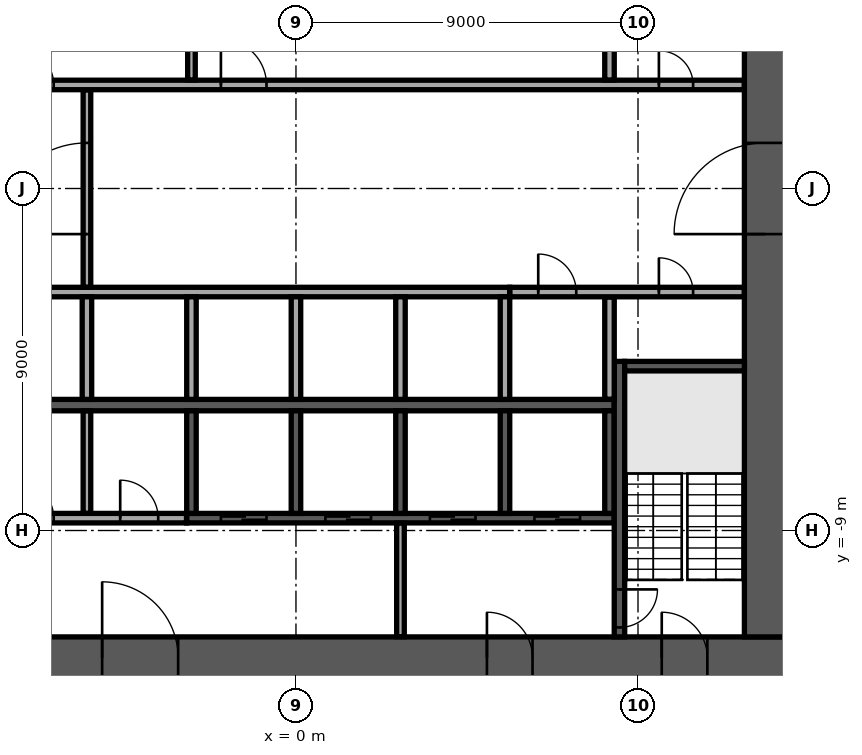
"""IFC4 building model, lengths in metres.
Left out: names, types, materials, properties, quantities, classifications, styles, units other than length and angle.
Written with IfcOpenShell. Run it as: python <this file> out.ifc"""

import sys

from ifc_helpers import new_model, si_unit, direction, frame, frame_2d, origin, place, context, subcontext, project, spatial, rectangle, extrude, element, fill, save


model = new_model("IFC4")
c1 = context("Model", 3, precision=1e-05, world=origin(), true_north=direction((0.0, 1.0)))
c2 = subcontext(c1, "Body", "Model", "MODEL_VIEW")
j1 = project(units=[si_unit("LENGTHUNIT", "METRE"), si_unit("PLANEANGLEUNIT", "RADIAN")], contexts=[c1])
p1 = place(None, origin())
s1 = spatial("IfcSite", under=j1, at=p1, CompositionType="ELEMENT")
p2 = place(p1, origin())
s2 = spatial("IfcBuilding", under=s1, at=p2, CompositionType="ELEMENT")
p3 = place(p2, frame((0.0, 0.0, 122.1)))
s3 = spatial("IfcBuildingStorey", under=s2, at=p3, CompositionType="ELEMENT", Elevation=122.1)
p4 = place(p3, frame((-12.9, -12.35, 0.0), z_axis=(0.0, 0.0, 1.0), x_axis=(1.0, 0.0, 0.0)))
e1 = element("IfcWall", 1, at=p4, inside=s3, PredefinedType="SHEAR", context=c2, shape_type="SweptSolid", body=[
    extrude(rectangle(XDim=25.8, YDim=1.1, at=frame_2d((12.9, 0.0))), origin(), (0.0, 0.0, 1.0), 3.58),
])
p5 = place(p4, frame((7.8, 0.0, 0.0)))
e2 = element("IfcOpeningElement", 2, at=p5, cuts=e1, PredefinedType="OPENING", context=c2, shape_type="SweptSolid", body=[
    extrude(rectangle(XDim=2.0, YDim=2.1, at=frame_2d((1.0, 1.05))), frame((0.0, 0.56, 0.0), z_axis=(0.0, -1.0, 0.0), x_axis=(1.0, 0.0, 0.0)), (0.0, 0.0, 1.0), 1.12),
])
p6 = place(p4, frame((17.925, 0.0, 0.0)))
e3 = element("IfcOpeningElement", 3, at=p6, cuts=e1, PredefinedType="OPENING", context=c2, shape_type="SweptSolid", body=[
    extrude(rectangle(XDim=1.2, YDim=2.1, at=frame_2d((0.6, 1.05))), frame((0.0, 0.56, 0.0), z_axis=(0.0, -1.0, 0.0), x_axis=(1.0, 0.0, 0.0)), (0.0, 0.0, 1.0), 1.12),
])
p7 = place(p4, frame((2.075, 0.0, 0.0)))
e4 = element("IfcOpeningElement", 4, at=p7, cuts=e1, PredefinedType="OPENING", context=c2, shape_type="SweptSolid", body=[
    extrude(rectangle(XDim=1.2, YDim=2.1, at=frame_2d((0.6, 1.05))), frame((0.0, 0.56, 0.0), z_axis=(0.0, -1.0, 0.0), x_axis=(1.0, 0.0, 0.0)), (0.0, 0.0, 1.0), 1.12),
])
p8 = place(p4, frame((22.525, 0.0, 0.0)))
e5 = element("IfcOpeningElement", 5, at=p8, cuts=e1, PredefinedType="OPENING", context=c2, shape_type="SweptSolid", body=[
    extrude(rectangle(XDim=1.2, YDim=2.1, at=frame_2d((0.6, 1.05))), frame((0.0, 0.56, 0.0), z_axis=(0.0, -1.0, 0.0), x_axis=(1.0, 0.0, 0.0)), (0.0, 0.0, 1.0), 1.12),
])
p9 = place(p3, frame((12.35, -11.8, 0.0), z_axis=(0.0, 0.0, 1.0), x_axis=(0.0, 1.0, 0.0)))
e6 = element("IfcWall", 6, at=p9, inside=s3, PredefinedType="SHEAR", context=c2, shape_type="SweptSolid", body=[
    extrude(rectangle(XDim=23.6, YDim=1.1, at=frame_2d((11.8, 0.0))), origin(), (0.0, 0.0, 1.0), 3.58),
])
p10 = place(p9, frame((10.6, 0.0, 0.0)))
e7 = element("IfcOpeningElement", 7, at=p10, cuts=e6, PredefinedType="OPENING", context=c2, shape_type="SweptSolid", body=[
    extrude(rectangle(XDim=2.4, YDim=2.4, at=frame_2d((1.2, 1.2))), frame((0.0, 0.56, 0.0), z_axis=(0.0, -1.0, 0.0), x_axis=(1.0, 0.0, 0.0)), (0.0, 0.0, 1.0), 1.12),
])
p11 = place(p3, frame((-8.375, -5.7, 0.0), z_axis=(0.0, 0.0, 1.0), x_axis=(1.0, 0.0, 0.0)))
e8 = element("IfcWall", 8, at=p11, inside=s3, PredefinedType="SOLIDWALL", context=c2, shape_type="SweptSolid", body=[
    extrude(rectangle(XDim=16.75, YDim=0.3, at=frame_2d((8.375, 0.0))), origin(), (0.0, 0.0, 1.0), 3.58),
])
p12 = place(p3, frame((-8.375, -2.725, 0.0), z_axis=(0.0, 0.0, 1.0), x_axis=(1.0, 0.0, 0.0)))
e9 = element("IfcWall", 9, at=p12, inside=s3, PredefinedType="SOLIDWALL", context=c2, shape_type="SweptSolid", body=[
    extrude(rectangle(XDim=14.0, YDim=0.25, at=frame_2d((7.0, 0.0))), origin(), (0.0, 0.0, 1.0), 3.58),
])
for number, where, z_axis, x_axis in (
    (10, (-5.5, -5.55, 0.0), (0.0, 0.0, 1.0), (0.0, 1.0, 0.0)),
    (11, (-2.75, -5.55, 0.0), (0.0, 0.0, 1.0), (0.0, 1.0, 0.0)),
    (12, (0.0, -5.55, 0.0), (0.0, 0.0, 1.0), (0.0, 1.0, 0.0)),
    (13, (2.75, -5.55, 0.0), (0.0, 0.0, 1.0), (0.0, 1.0, 0.0)),
    (14, (5.5, -5.55, 0.0), (0.0, 0.0, 1.0), (0.0, 1.0, 0.0)),
):
    element("IfcWall", number, at=place(p3, frame(where, z_axis=z_axis, x_axis=x_axis)), inside=s3, PredefinedType="SOLIDWALL", context=c2, shape_type="SweptSolid", body=[
        extrude(rectangle(XDim=2.7, YDim=0.25, at=frame_2d((1.35, 0.0))), origin(), (0.0, 0.0, 1.0), 3.58),
    ])
p13 = place(p3, frame((-2.875, -8.675, 0.0), z_axis=(0.0, 0.0, 1.0), x_axis=(1.0, 0.0, 0.0)))
e15 = element("IfcWall", 15, at=p13, inside=s3, PredefinedType="SOLIDWALL", context=c2, shape_type="SweptSolid", body=[
    extrude(rectangle(XDim=11.25, YDim=0.25, at=frame_2d((5.625, 0.0))), origin(), (0.0, 0.0, 1.0), 3.58),
])
p14 = place(p13, frame((0.9, 0.0, 0.0)))
e16 = element("IfcOpeningElement", 16, at=p14, cuts=e15, PredefinedType="OPENING", context=c2, shape_type="SweptSolid", body=[
    extrude(rectangle(XDim=1.2, YDim=2.1, at=frame_2d((0.6, 1.05))), frame((0.0, 0.135, 0.0), z_axis=(0.0, -1.0, 0.0), x_axis=(1.0, 0.0, 0.0)), (0.0, 0.0, 1.0), 0.27),
])
p15 = place(p13, frame((3.65, 0.0, 0.0)))
e17 = element("IfcOpeningElement", 17, at=p15, cuts=e15, PredefinedType="OPENING", context=c2, shape_type="SweptSolid", body=[
    extrude(rectangle(XDim=1.2, YDim=2.1, at=frame_2d((0.6, 1.05))), frame((0.0, 0.135, 0.0), z_axis=(0.0, -1.0, 0.0), x_axis=(1.0, 0.0, 0.0)), (0.0, 0.0, 1.0), 0.27),
])
p16 = place(p13, frame((6.4, 0.0, 0.0)))
e18 = element("IfcOpeningElement", 18, at=p16, cuts=e15, PredefinedType="OPENING", context=c2, shape_type="SweptSolid", body=[
    extrude(rectangle(XDim=1.2, YDim=2.1, at=frame_2d((0.6, 1.05))), frame((0.0, 0.135, 0.0), z_axis=(0.0, -1.0, 0.0), x_axis=(1.0, 0.0, 0.0)), (0.0, 0.0, 1.0), 0.27),
])
p17 = place(p13, frame((9.15, 0.0, 0.0)))
e19 = element("IfcOpeningElement", 19, at=p17, cuts=e15, PredefinedType="OPENING", context=c2, shape_type="SweptSolid", body=[
    extrude(rectangle(XDim=1.2, YDim=2.1, at=frame_2d((0.6, 1.05))), frame((0.0, 0.135, 0.0), z_axis=(0.0, -1.0, 0.0), x_axis=(1.0, 0.0, 0.0)), (0.0, 0.0, 1.0), 0.27),
])
for number, where, z_axis, x_axis in (
    (20, (-2.75, -8.55, 0.0), (0.0, 0.0, 1.0), (0.0, 1.0, 0.0)),
    (21, (0.0, -8.55, 0.0), (0.0, 0.0, 1.0), (0.0, 1.0, 0.0)),
    (22, (2.75, -8.55, 0.0), (0.0, 0.0, 1.0), (0.0, 1.0, 0.0)),
    (23, (5.5, -8.55, 0.0), (0.0, 0.0, 1.0), (0.0, 1.0, 0.0)),
    (24, (8.25, -8.55, 0.0), (0.0, 0.0, 1.0), (0.0, 1.0, 0.0)),
):
    element("IfcWall", number, at=place(p3, frame(where, z_axis=z_axis, x_axis=x_axis)), inside=s3, PredefinedType="SOLIDWALL", context=c2, shape_type="SweptSolid", body=[
        extrude(rectangle(XDim=2.7, YDim=0.25, at=frame_2d((1.35, 0.0))), origin(), (0.0, 0.0, 1.0), 3.58),
    ])
p18 = place(p3, frame((8.512, -4.55, 0.0), z_axis=(0.0, 0.0, 1.0), x_axis=(0.0, -1.0, 0.0)))
e25 = element("IfcWall", 25, at=p18, inside=s3, PredefinedType="SOLIDWALL", context=c2, shape_type="SweptSolid", body=[
    extrude(rectangle(XDim=7.25, YDim=0.275, at=frame_2d((3.625, 0.0))), origin(), (0.0, 0.0, 1.0), 3.58),
])
p19 = place(p18, frame((6.0, 0.0, 0.0)))
e26 = element("IfcOpeningElement", 26, at=p19, cuts=e25, PredefinedType="OPENING", context=c2, shape_type="SweptSolid", body=[
    extrude(rectangle(XDim=1.0, YDim=2.1, at=frame_2d((0.5, 1.05))), frame((0.0, 0.147, 0.0), z_axis=(0.0, -1.0, 0.0), x_axis=(1.0, 0.0, 0.0)), (0.0, 0.0, 1.0), 0.295),
])
p20 = place(p3, frame((8.65, -4.675, 0.0), z_axis=(0.0, 0.0, 1.0), x_axis=(1.0, 0.0, 0.0)))
e27 = element("IfcWall", 27, at=p20, inside=s3, PredefinedType="SOLIDWALL", context=c2, shape_type="SweptSolid", body=[
    extrude(rectangle(XDim=3.15, YDim=0.25, at=frame_2d((1.575, 0.0))), origin(), (0.0, 0.0, 1.0), 3.58),
])
p21 = place(p3, frame((2.75, -11.795, 0.0), z_axis=(0.0, 0.0, 1.0), x_axis=(0.0, 1.0, 0.0)))
e28 = element("IfcWall", 28, at=p21, inside=s3, PredefinedType="PARTITIONING", context=c2, shape_type="SweptSolid", body=[
    extrude(rectangle(XDim=2.99, YDim=0.2, at=frame_2d((1.495, 0.0))), origin(), (0.0, 0.0, 1.0), 3.58),
])
p22 = place(p3, frame((-8.37, -8.675, 0.0), z_axis=(0.0, 0.0, 1.0), x_axis=(1.0, 0.0, 0.0)))
e29 = element("IfcWall", 29, at=p22, inside=s3, PredefinedType="PARTITIONING", context=c2, shape_type="SweptSolid", body=[
    extrude(rectangle(XDim=5.49, YDim=0.25, at=frame_2d((2.745, 0.0))), origin(), (0.0, 0.0, 1.0), 3.58),
])
p23 = place(p22, frame((0.995, 0.0, 0.0)))
e30 = element("IfcOpeningElement", 30, at=p23, cuts=e29, PredefinedType="OPENING", context=c2, shape_type="SweptSolid", body=[
    extrude(rectangle(XDim=1.0, YDim=2.1, at=frame_2d((0.5, 1.05))), frame((0.0, 0.135, 0.0), z_axis=(0.0, -1.0, 0.0), x_axis=(1.0, 0.0, 0.0)), (0.0, 0.0, 1.0), 0.27),
])
p24 = place(p22, frame((3.745, 0.0, 0.0)))
e31 = element("IfcOpeningElement", 31, at=p24, cuts=e29, PredefinedType="OPENING", context=c2, shape_type="SweptSolid", body=[
    extrude(rectangle(XDim=1.0, YDim=2.1, at=frame_2d((0.5, 1.05))), frame((0.0, 0.135, 0.0), z_axis=(0.0, -1.0, 0.0), x_axis=(1.0, 0.0, 0.0)), (0.0, 0.0, 1.0), 0.27),
])
p25 = place(p3, frame((-5.5, -8.545, 0.0), z_axis=(0.0, 0.0, 1.0), x_axis=(0.0, 1.0, 0.0)))
e32 = element("IfcWall", 32, at=p25, inside=s3, PredefinedType="PARTITIONING", context=c2, shape_type="SweptSolid", body=[
    extrude(rectangle(XDim=2.69, YDim=0.2, at=frame_2d((1.345, 0.0))), origin(), (0.0, 0.0, 1.0), 3.58),
])
p26 = place(p3, frame((8.25, -5.545, 0.0), z_axis=(0.0, 0.0, 1.0), x_axis=(0.0, 1.0, 0.0)))
e33 = element("IfcWall", 33, at=p26, inside=s3, PredefinedType="PARTITIONING", context=c2, shape_type="SweptSolid", body=[
    extrude(rectangle(XDim=2.69, YDim=0.25, at=frame_2d((1.345, 0.0))), origin(), (0.0, 0.0, 1.0), 3.58),
])
p27 = place(p3, frame((5.63, -2.725, 0.0), z_axis=(0.0, 0.0, 1.0), x_axis=(1.0, 0.0, 0.0)))
e34 = element("IfcWall", 34, at=p27, inside=s3, PredefinedType="PARTITIONING", context=c2, shape_type="SweptSolid", body=[
    extrude(rectangle(XDim=6.165, YDim=0.25, at=frame_2d((3.083, 0.0))), origin(), (0.0, 0.0, 1.0), 3.58),
])
p28 = place(p27, frame((0.745, 0.0, 0.0)))
e35 = element("IfcOpeningElement", 35, at=p28, cuts=e34, PredefinedType="OPENING", context=c2, shape_type="SweptSolid", body=[
    extrude(rectangle(XDim=1.0, YDim=2.1, at=frame_2d((0.5, 1.05))), frame((0.0, 0.135, 0.0), z_axis=(0.0, -1.0, 0.0), x_axis=(1.0, 0.0, 0.0)), (0.0, 0.0, 1.0), 0.27),
])
p29 = place(p27, frame((3.92, 0.0, 0.0)))
e36 = element("IfcOpeningElement", 36, at=p29, cuts=e34, PredefinedType="OPENING", context=c2, shape_type="SweptSolid", body=[
    extrude(rectangle(XDim=0.9, YDim=2.1, at=frame_2d((0.45, 1.05))), frame((0.0, 0.135, 0.0), z_axis=(0.0, -1.0, 0.0), x_axis=(1.0, 0.0, 0.0)), (0.0, 0.0, 1.0), 0.27),
])
p30 = place(p3, frame((-5.5, -2.595, 0.0), z_axis=(0.0, 0.0, 1.0), x_axis=(0.0, 1.0, 0.0)))
e37 = element("IfcWall", 37, at=p30, inside=s3, PredefinedType="PARTITIONING", context=c2, shape_type="SweptSolid", body=[
    extrude(rectangle(XDim=5.19, YDim=0.2, at=frame_2d((2.595, 0.0))), origin(), (0.0, 0.0, 1.0), 3.58),
])
p31 = place(p30, frame((1.395, 0.0, 0.0)))
e38 = element("IfcOpeningElement", 38, at=p31, cuts=e37, PredefinedType="OPENING", context=c2, shape_type="SweptSolid", body=[
    extrude(rectangle(XDim=2.4, YDim=2.4, at=frame_2d((1.2, 1.2))), frame((0.0, 0.11, 0.0), z_axis=(0.0, -1.0, 0.0), x_axis=(1.0, 0.0, 0.0)), (0.0, 0.0, 1.0), 0.22),
])
p32 = place(p3, frame((-11.795, 2.725, 0.0), z_axis=(0.0, 0.0, 1.0), x_axis=(1.0, 0.0, 0.0)))
e39 = element("IfcWall", 39, at=p32, inside=s3, PredefinedType="PARTITIONING", context=c2, shape_type="SweptSolid", body=[
    extrude(rectangle(XDim=23.59, YDim=0.25, at=frame_2d((11.795, 0.0))), origin(), (0.0, 0.0, 1.0), 3.58),
])
p33 = place(p32, frame((21.345, 0.0, 0.0)))
e40 = element("IfcOpeningElement", 40, at=p33, cuts=e39, PredefinedType="OPENING", context=c2, shape_type="SweptSolid", body=[
    extrude(rectangle(XDim=0.9, YDim=2.1, at=frame_2d((0.45, 1.05))), frame((0.0, 0.135, 0.0), z_axis=(0.0, -1.0, 0.0), x_axis=(1.0, 0.0, 0.0)), (0.0, 0.0, 1.0), 0.27),
])
p34 = place(p32, frame((1.345, 0.0, 0.0)))
e41 = element("IfcOpeningElement", 41, at=p34, cuts=e39, PredefinedType="OPENING", context=c2, shape_type="SweptSolid", body=[
    extrude(rectangle(XDim=0.9, YDim=2.1, at=frame_2d((0.45, 1.05))), frame((0.0, 0.135, 0.0), z_axis=(0.0, -1.0, 0.0), x_axis=(1.0, 0.0, 0.0)), (0.0, 0.0, 1.0), 0.27),
])
p35 = place(p32, frame((4.42, 0.0, 0.0)))
e42 = element("IfcOpeningElement", 42, at=p35, cuts=e39, PredefinedType="OPENING", context=c2, shape_type="SweptSolid", body=[
    extrude(rectangle(XDim=1.0, YDim=2.1, at=frame_2d((0.5, 1.05))), frame((0.0, 0.135, 0.0), z_axis=(0.0, -1.0, 0.0), x_axis=(1.0, 0.0, 0.0)), (0.0, 0.0, 1.0), 0.27),
])
p36 = place(p32, frame((9.82, 0.0, 0.0)))
e43 = element("IfcOpeningElement", 43, at=p36, cuts=e39, PredefinedType="OPENING", context=c2, shape_type="SweptSolid", body=[
    extrude(rectangle(XDim=1.2, YDim=2.1, at=frame_2d((0.6, 1.05))), frame((0.0, 0.135, 0.0), z_axis=(0.0, -1.0, 0.0), x_axis=(1.0, 0.0, 0.0)), (0.0, 0.0, 1.0), 0.27),
])
p37 = place(p3, frame((-2.75, 2.855, 0.0), z_axis=(0.0, 0.0, 1.0), x_axis=(0.0, 1.0, 0.0)))
e44 = element("IfcWall", 44, at=p37, inside=s3, PredefinedType="PARTITIONING", context=c2, shape_type="SweptSolid", body=[
    extrude(rectangle(XDim=2.69, YDim=0.2, at=frame_2d((1.345, 0.0))), origin(), (0.0, 0.0, 1.0), 3.58),
])
p38 = place(p3, frame((8.25, 2.855, 0.0), z_axis=(0.0, 0.0, 1.0), x_axis=(0.0, 1.0, 0.0)))
e45 = element("IfcWall", 45, at=p38, inside=s3, PredefinedType="PARTITIONING", context=c2, shape_type="SweptSolid", body=[
    extrude(rectangle(XDim=2.69, YDim=0.25, at=frame_2d((1.345, 0.0))), origin(), (0.0, 0.0, 1.0), 3.58),
])
p39 = place(p5, origin())
e46 = element("IfcDoor", 46, at=p39, inside=s3, OperationType="SINGLE_SWING_LEFT", PredefinedType="DOOR", context=c2, shape_type="SweptSolid", body=[
    extrude(rectangle(XDim=2.0, YDim=2.1, at=frame_2d((1.0, 1.05))), frame((0.0, 0.025, 0.0), z_axis=(0.0, -1.0, 0.0), x_axis=(1.0, 0.0, 0.0)), (0.0, 0.0, 1.0), 0.05),
])
fill(e2, e46)
p40 = place(p6, origin())
e47 = element("IfcDoor", 47, at=p40, inside=s3, OperationType="SINGLE_SWING_LEFT", PredefinedType="DOOR", context=c2, shape_type="SweptSolid", body=[
    extrude(rectangle(XDim=1.2, YDim=2.1, at=frame_2d((0.6, 1.05))), frame((0.0, 0.025, 0.0), z_axis=(0.0, -1.0, 0.0), x_axis=(1.0, 0.0, 0.0)), (0.0, 0.0, 1.0), 0.05),
])
fill(e3, e47)
p41 = place(p8, origin())
e48 = element("IfcDoor", 48, at=p41, inside=s3, OperationType="SINGLE_SWING_LEFT", PredefinedType="DOOR", context=c2, shape_type="SweptSolid", body=[
    extrude(rectangle(XDim=1.2, YDim=2.1, at=frame_2d((0.6, 1.05))), frame((0.0, 0.025, 0.0), z_axis=(0.0, -1.0, 0.0), x_axis=(1.0, 0.0, 0.0)), (0.0, 0.0, 1.0), 0.05),
])
fill(e5, e48)
p42 = place(p10, origin())
e49 = element("IfcDoor", 49, at=p42, inside=s3, OperationType="SINGLE_SWING_LEFT", PredefinedType="DOOR", context=c2, shape_type="SweptSolid", body=[
    extrude(rectangle(XDim=2.4, YDim=2.4, at=frame_2d((1.2, 1.2))), frame((0.0, 0.025, 0.0), z_axis=(0.0, -1.0, 0.0), x_axis=(1.0, 0.0, 0.0)), (0.0, 0.0, 1.0), 0.05),
])
fill(e7, e49)
p43 = place(p14, origin())
e50 = element("IfcDoor", 50, at=p43, inside=s3, OperationType="DOUBLE_DOOR_SLIDING", PredefinedType="DOOR", context=c2, shape_type="SweptSolid", body=[
    extrude(rectangle(XDim=1.2, YDim=2.1, at=frame_2d((0.6, 1.05))), frame((0.0, 0.025, 0.0), z_axis=(0.0, -1.0, 0.0), x_axis=(1.0, 0.0, 0.0)), (0.0, 0.0, 1.0), 0.05),
])
fill(e16, e50)
p44 = place(p15, origin())
e51 = element("IfcDoor", 51, at=p44, inside=s3, OperationType="DOUBLE_DOOR_SLIDING", PredefinedType="DOOR", context=c2, shape_type="SweptSolid", body=[
    extrude(rectangle(XDim=1.2, YDim=2.1, at=frame_2d((0.6, 1.05))), frame((0.0, 0.025, 0.0), z_axis=(0.0, -1.0, 0.0), x_axis=(1.0, 0.0, 0.0)), (0.0, 0.0, 1.0), 0.05),
])
fill(e17, e51)
p45 = place(p16, origin())
e52 = element("IfcDoor", 52, at=p45, inside=s3, OperationType="DOUBLE_DOOR_SLIDING", PredefinedType="DOOR", context=c2, shape_type="SweptSolid", body=[
    extrude(rectangle(XDim=1.2, YDim=2.1, at=frame_2d((0.6, 1.05))), frame((0.0, 0.025, 0.0), z_axis=(0.0, -1.0, 0.0), x_axis=(1.0, 0.0, 0.0)), (0.0, 0.0, 1.0), 0.05),
])
fill(e18, e52)
p46 = place(p17, origin())
e53 = element("IfcDoor", 53, at=p46, inside=s3, OperationType="DOUBLE_DOOR_SLIDING", PredefinedType="DOOR", context=c2, shape_type="SweptSolid", body=[
    extrude(rectangle(XDim=1.2, YDim=2.1, at=frame_2d((0.6, 1.05))), frame((0.0, 0.025, 0.0), z_axis=(0.0, -1.0, 0.0), x_axis=(1.0, 0.0, 0.0)), (0.0, 0.0, 1.0), 0.05),
])
fill(e19, e53)
p47 = place(p19, origin())
e54 = element("IfcDoor", 54, at=p47, inside=s3, OperationType="SINGLE_SWING_LEFT", PredefinedType="DOOR", context=c2, shape_type="SweptSolid", body=[
    extrude(rectangle(XDim=1.0, YDim=2.1, at=frame_2d((0.5, 1.05))), frame((0.0, 0.025, 0.0), z_axis=(0.0, -1.0, 0.0), x_axis=(1.0, 0.0, 0.0)), (0.0, 0.0, 1.0), 0.05),
])
fill(e26, e54)
p48 = place(p23, origin())
e55 = element("IfcDoor", 55, at=p48, inside=s3, OperationType="SINGLE_SWING_LEFT", PredefinedType="DOOR", context=c2, shape_type="SweptSolid", body=[
    extrude(rectangle(XDim=1.0, YDim=2.1, at=frame_2d((0.5, 1.05))), frame((0.0, 0.025, 0.0), z_axis=(0.0, -1.0, 0.0), x_axis=(1.0, 0.0, 0.0)), (0.0, 0.0, 1.0), 0.05),
])
fill(e30, e55)
p49 = place(p24, origin())
e56 = element("IfcDoor", 56, at=p49, inside=s3, OperationType="SINGLE_SWING_LEFT", PredefinedType="DOOR", context=c2, shape_type="SweptSolid", body=[
    extrude(rectangle(XDim=1.0, YDim=2.1, at=frame_2d((0.5, 1.05))), frame((0.0, 0.025, 0.0), z_axis=(0.0, -1.0, 0.0), x_axis=(1.0, 0.0, 0.0)), (0.0, 0.0, 1.0), 0.05),
])
fill(e31, e56)
p50 = place(p28, origin())
e57 = element("IfcDoor", 57, at=p50, inside=s3, OperationType="SINGLE_SWING_LEFT", PredefinedType="DOOR", context=c2, shape_type="SweptSolid", body=[
    extrude(rectangle(XDim=1.0, YDim=2.1, at=frame_2d((0.5, 1.05))), frame((0.0, 0.025, 0.0), z_axis=(0.0, -1.0, 0.0), x_axis=(1.0, 0.0, 0.0)), (0.0, 0.0, 1.0), 0.05),
])
fill(e35, e57)
p51 = place(p33, origin())
e58 = element("IfcDoor", 58, at=p51, inside=s3, OperationType="SINGLE_SWING_LEFT", PredefinedType="DOOR", context=c2, shape_type="SweptSolid", body=[
    extrude(rectangle(XDim=0.9, YDim=2.1, at=frame_2d((0.45, 1.05))), frame((0.0, 0.025, 0.0), z_axis=(0.0, -1.0, 0.0), x_axis=(1.0, 0.0, 0.0)), (0.0, 0.0, 1.0), 0.05),
])
fill(e40, e58)
p52 = place(p29, origin())
e59 = element("IfcDoor", 59, at=p52, inside=s3, OperationType="SINGLE_SWING_LEFT", PredefinedType="DOOR", context=c2, shape_type="SweptSolid", body=[
    extrude(rectangle(XDim=0.9, YDim=2.1, at=frame_2d((0.45, 1.05))), frame((0.0, 0.025, 0.0), z_axis=(0.0, -1.0, 0.0), x_axis=(1.0, 0.0, 0.0)), (0.0, 0.0, 1.0), 0.05),
])
fill(e36, e59)
p53 = place(p35, origin())
e60 = element("IfcDoor", 60, at=p53, inside=s3, OperationType="SINGLE_SWING_LEFT", PredefinedType="DOOR", context=c2, shape_type="SweptSolid", body=[
    extrude(rectangle(XDim=1.0, YDim=2.1, at=frame_2d((0.5, 1.05))), frame((0.0, 0.025, 0.0), z_axis=(0.0, -1.0, 0.0), x_axis=(1.0, 0.0, 0.0)), (0.0, 0.0, 1.0), 0.05),
])
fill(e42, e60)
p54 = place(p36, origin())
e61 = element("IfcDoor", 61, at=p54, inside=s3, OperationType="SINGLE_SWING_LEFT", PredefinedType="DOOR", context=c2, shape_type="SweptSolid", body=[
    extrude(rectangle(XDim=1.2, YDim=2.1, at=frame_2d((0.6, 1.05))), frame((0.0, 0.025, 0.0), z_axis=(0.0, -1.0, 0.0), x_axis=(1.0, 0.0, 0.0)), (0.0, 0.0, 1.0), 0.05),
])
fill(e43, e61)
p55 = place(p31, origin())
e62 = element("IfcDoor", 62, at=p55, inside=s3, OperationType="SINGLE_SWING_LEFT", PredefinedType="DOOR", context=c2, shape_type="SweptSolid", body=[
    extrude(rectangle(XDim=2.4, YDim=2.4, at=frame_2d((1.2, 1.2))), frame((0.0, 0.025, 0.0), z_axis=(0.0, -1.0, 0.0), x_axis=(1.0, 0.0, 0.0)), (0.0, 0.0, 1.0), 0.05),
])
fill(e38, e62)
save(model, sys.argv[1])
